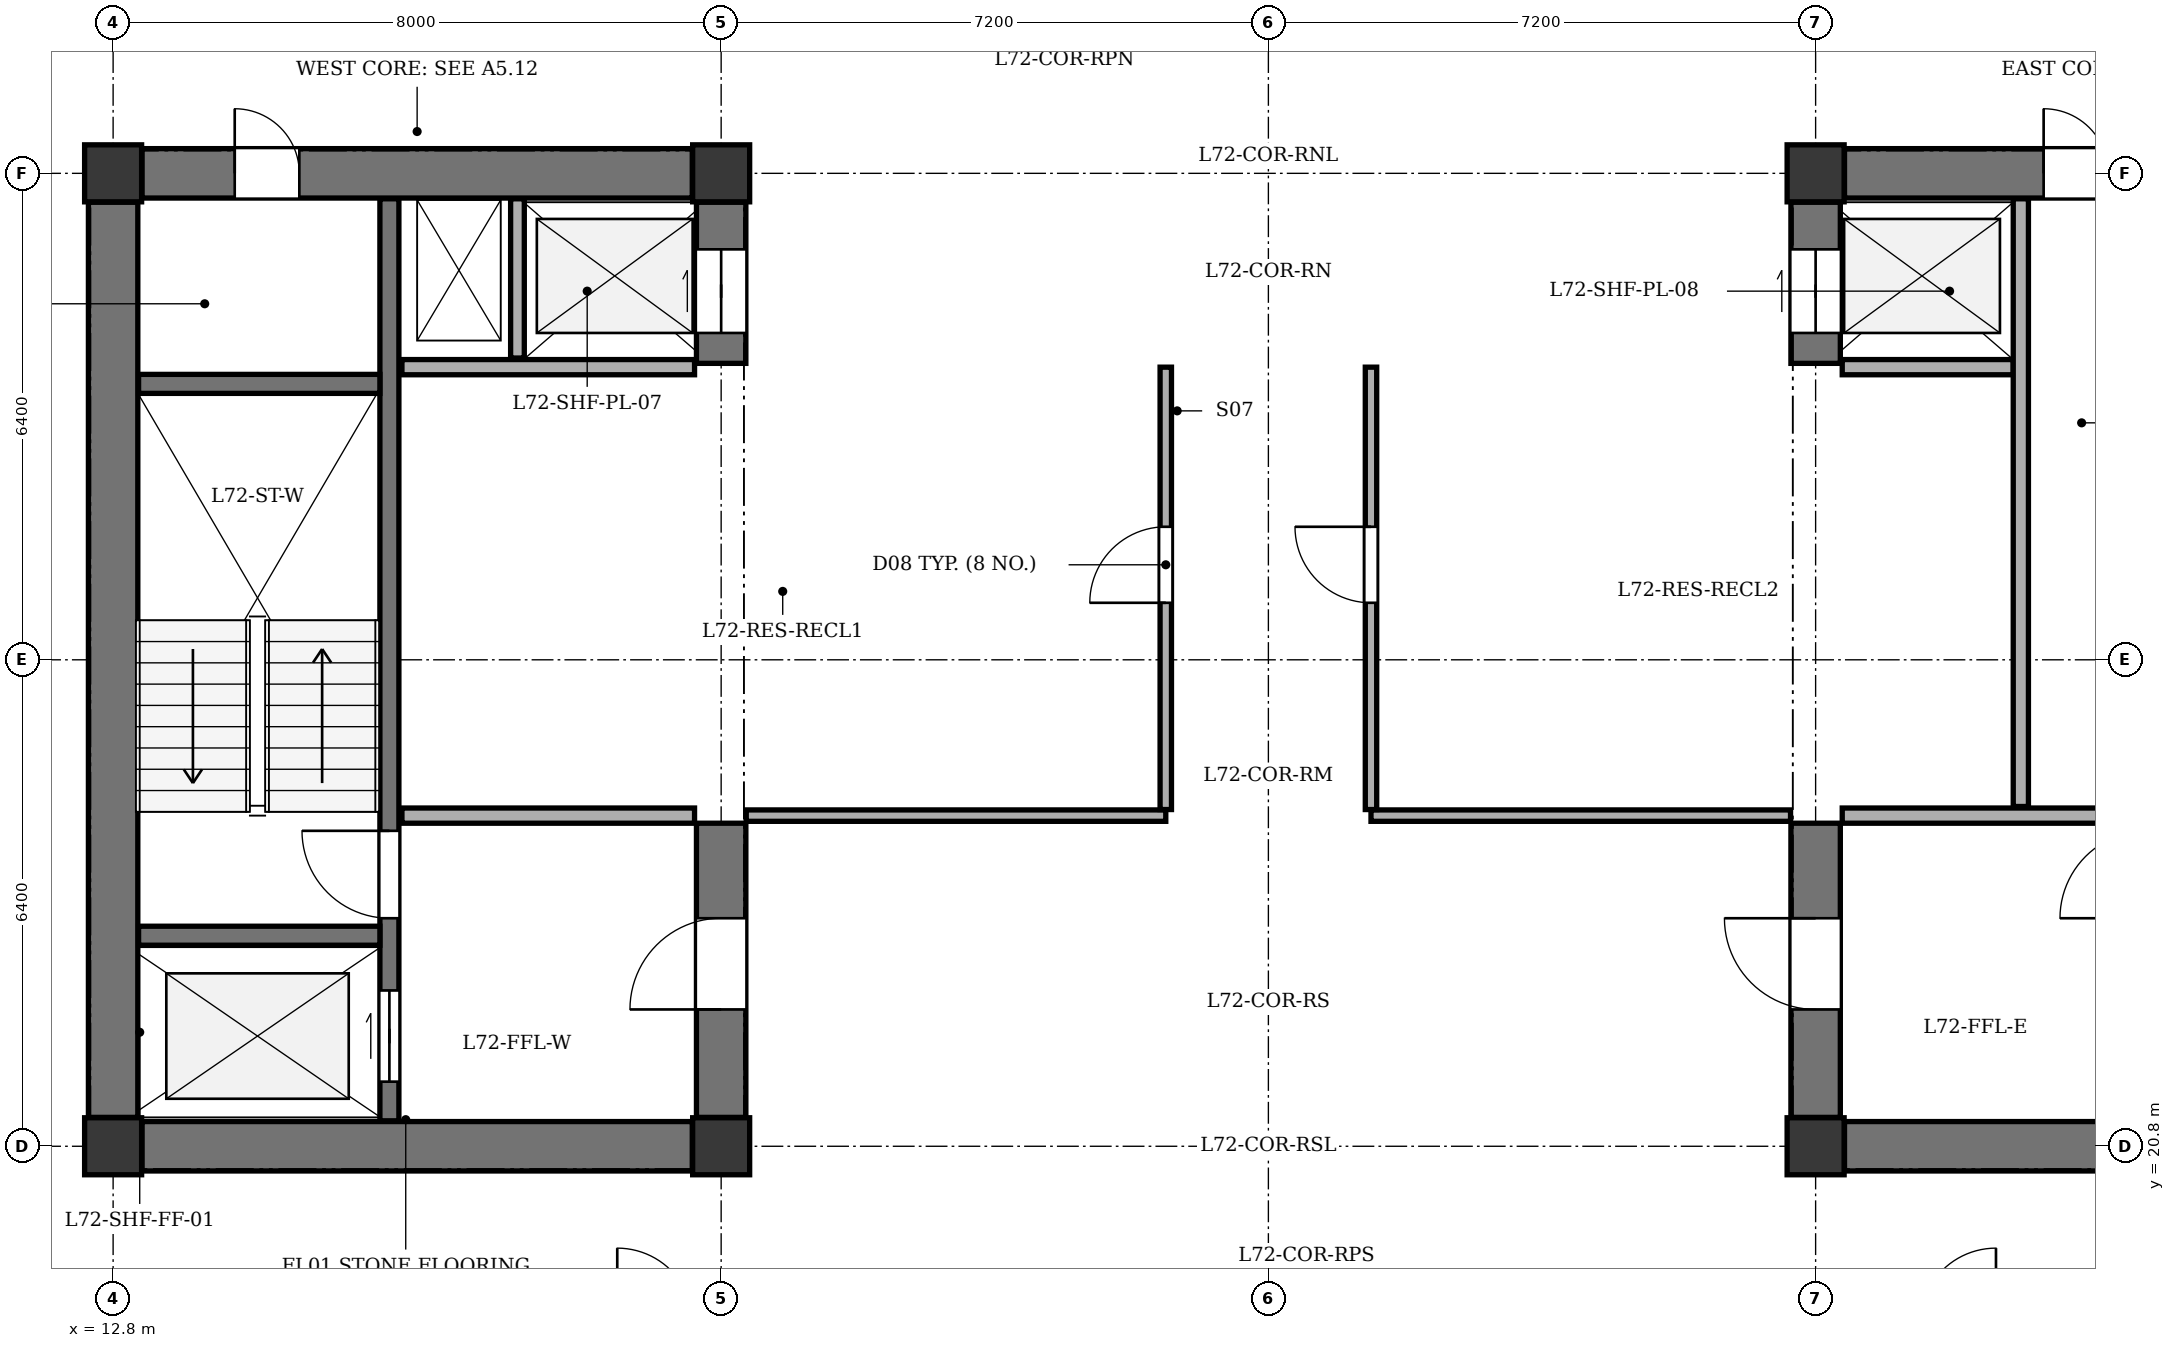
"""IFC4 building model, lengths in metres.
Left out: names, types, materials, properties, quantities, classifications, styles, units other than length and angle.
Written with IfcOpenShell. Run it as: python <this file> out.ifc"""

import sys

from ifc_helpers import new_model, si_unit, direction, frame, frame_2d, origin, origin_2d, place, context, subcontext, project, spatial, rectangle, extrude, element, fill, save


model = new_model("IFC4")
c1 = context("Model", 3, precision=1e-05, world=origin(), true_north=direction((0.0, 1.0)))
c2 = subcontext(c1, "Body", "Model", "MODEL_VIEW")
j1 = project(units=[si_unit("LENGTHUNIT", "METRE"), si_unit("PLANEANGLEUNIT", "RADIAN")], contexts=[c1])
p1 = place(None, origin())
s1 = spatial("IfcSite", under=j1, at=p1, CompositionType="ELEMENT")
p2 = place(p1, origin())
s2 = spatial("IfcBuilding", under=s1, at=p2, CompositionType="ELEMENT")
p3 = place(p2, frame((0.0, 0.0, 272.1)))
s3 = spatial("IfcBuildingStorey", under=s2, at=p3, CompositionType="ELEMENT", Elevation=272.1)
for number, where, z_axis, x_axis in (
    (1, (12.8, 20.8, 0.0), (0.0, 0.0, 1.0), (1.0, 0.0, 0.0)),
    (2, (20.8, 20.8, 0.0), (0.0, 0.0, 1.0), (1.0, 0.0, 0.0)),
    (3, (12.8, 33.6, 0.0), (0.0, 0.0, 1.0), (1.0, 0.0, 0.0)),
    (4, (20.8, 33.6, 0.0), (0.0, 0.0, 1.0), (1.0, 0.0, 0.0)),
    (5, (35.2, 20.8, 0.0), (0.0, 0.0, 1.0), (1.0, 0.0, 0.0)),
    (6, (35.2, 33.6, 0.0), (0.0, 0.0, 1.0), (1.0, 0.0, 0.0)),
):
    element("IfcColumn", number, at=place(p3, frame(where, z_axis=z_axis, x_axis=x_axis)), inside=s3, PredefinedType="COLUMN", context=c2, shape_type="SweptSolid", body=[
        extrude(rectangle(XDim=0.75, YDim=0.75, at=origin_2d()), origin(), (0.0, 0.0, 1.0), 3.4),
    ])
p4 = place(p3, frame((12.8, 21.18, 0.0), z_axis=(0.0, 0.0, 1.0), x_axis=(0.0, 1.0, 0.0)))
e7 = element("IfcWall", 7, at=p4, inside=s3, PredefinedType="SHEAR", context=c2, shape_type="SweptSolid", body=[
    extrude(rectangle(XDim=12.04, YDim=0.65, at=frame_2d((6.02, 0.0))), origin(), (0.0, 0.0, 1.0), 3.1),
])
p5 = place(p3, frame((13.18, 20.8, 0.0), z_axis=(0.0, 0.0, 1.0), x_axis=(1.0, 0.0, 0.0)))
e8 = element("IfcWall", 8, at=p5, inside=s3, PredefinedType="SHEAR", context=c2, shape_type="SweptSolid", body=[
    extrude(rectangle(XDim=7.24, YDim=0.65, at=frame_2d((3.62, 0.0))), origin(), (0.0, 0.0, 1.0), 3.1),
])
p6 = place(p3, frame((13.18, 33.6, 0.0), z_axis=(0.0, 0.0, 1.0), x_axis=(1.0, 0.0, 0.0)))
e9 = element("IfcWall", 9, at=p6, inside=s3, PredefinedType="SHEAR", context=c2, shape_type="SweptSolid", body=[
    extrude(rectangle(XDim=7.24, YDim=0.65, at=frame_2d((3.62, 0.0))), origin(), (0.0, 0.0, 1.0), 3.1),
])
p7 = place(p6, frame((1.22, 0.0, 0.0)))
e10 = element("IfcOpeningElement", 10, at=p7, cuts=e9, PredefinedType="OPENING", context=c2, shape_type="SweptSolid", body=[
    extrude(rectangle(XDim=0.85, YDim=2.02, at=frame_2d((0.425, 1.01))), frame((0.0, 0.335, 0.0), z_axis=(0.0, -1.0, 0.0), x_axis=(1.0, 0.0, 0.0)), (0.0, 0.0, 1.0), 0.67),
])
p8 = place(p3, frame((20.8, 21.18, 0.0), z_axis=(0.0, 0.0, 1.0), x_axis=(0.0, 1.0, 0.0)))
e11 = element("IfcWall", 11, at=p8, inside=s3, PredefinedType="SHEAR", context=c2, shape_type="SweptSolid", body=[
    extrude(rectangle(XDim=3.87, YDim=0.65, at=frame_2d((1.935, 0.0))), origin(), (0.0, 0.0, 1.0), 3.1),
])
p9 = place(p8, frame((1.42, 0.0, 0.0)))
e12 = element("IfcOpeningElement", 12, at=p9, cuts=e11, PredefinedType="OPENING", context=c2, shape_type="SweptSolid", body=[
    extrude(rectangle(XDim=1.2, YDim=2.15, at=frame_2d((0.6, 1.075))), frame((0.0, 0.335, 0.0), z_axis=(0.0, -1.0, 0.0), x_axis=(1.0, 0.0, 0.0)), (0.0, 0.0, 1.0), 0.67),
])
p10 = place(p3, frame((20.8, 31.1, 0.0), z_axis=(0.0, 0.0, 1.0), x_axis=(0.0, 1.0, 0.0)))
e13 = element("IfcWall", 13, at=p10, inside=s3, PredefinedType="SHEAR", context=c2, shape_type="SweptSolid", body=[
    extrude(rectangle(XDim=2.12, YDim=0.65, at=frame_2d((1.06, 0.0))), origin(), (0.0, 0.0, 1.0), 3.1),
])
p11 = place(p10, frame((0.4, 0.0, 0.0)))
e14 = element("IfcOpeningElement", 14, at=p11, cuts=e13, PredefinedType="OPENING", context=c2, shape_type="SweptSolid", body=[
    extrude(rectangle(XDim=1.1, YDim=2.1, at=frame_2d((0.55, 1.05))), frame((0.0, 0.335, 0.0), z_axis=(0.0, -1.0, 0.0), x_axis=(1.0, 0.0, 0.0)), (0.0, 0.0, 1.0), 0.67),
])
p12 = place(p3, frame((16.435, 21.135, 0.0), z_axis=(0.0, 0.0, 1.0), x_axis=(0.0, 1.0, 0.0)))
e15 = element("IfcWall", 15, at=p12, inside=s3, PredefinedType="SHEAR", context=c2, shape_type="SweptSolid", body=[
    extrude(rectangle(XDim=12.13, YDim=0.25, at=frame_2d((6.065, 0.0))), origin(), (0.0, 0.0, 1.0), 3.1),
])
p13 = place(p12, frame((0.515, 0.0, 0.0)))
e16 = element("IfcOpeningElement", 16, at=p13, cuts=e15, PredefinedType="OPENING", context=c2, shape_type="SweptSolid", body=[
    extrude(rectangle(XDim=1.2, YDim=2.15, at=frame_2d((0.6, 1.075))), frame((0.0, 0.135, 0.0), z_axis=(0.0, -1.0, 0.0), x_axis=(1.0, 0.0, 0.0)), (0.0, 0.0, 1.0), 0.27),
])
p14 = place(p12, frame((2.665, 0.0, 0.0)))
e17 = element("IfcOpeningElement", 17, at=p14, cuts=e15, PredefinedType="OPENING", context=c2, shape_type="SweptSolid", body=[
    extrude(rectangle(XDim=1.15, YDim=2.15, at=frame_2d((0.575, 1.075))), frame((0.0, 0.135, 0.0), z_axis=(0.0, -1.0, 0.0), x_axis=(1.0, 0.0, 0.0)), (0.0, 0.0, 1.0), 0.27),
])
for number, where, z_axis, x_axis in (
    (18, (13.135, 23.57, 0.0), (0.0, 0.0, 1.0), (1.0, 0.0, 0.0)),
    (19, (13.135, 30.83, 0.0), (0.0, 0.0, 1.0), (1.0, 0.0, 0.0)),
):
    element("IfcWall", number, at=place(p3, frame(where, z_axis=z_axis, x_axis=x_axis)), inside=s3, PredefinedType="SHEAR", context=c2, shape_type="SweptSolid", body=[
        extrude(rectangle(XDim=3.175, YDim=0.25, at=frame_2d((1.587, 0.0))), origin(), (0.0, 0.0, 1.0), 3.1),
    ])
for number, where, z_axis, x_axis in (
    (20, (16.6, 25.15, 0.0), (0.0, 0.0, 1.0), (1.0, 0.0, 0.0)),
    (21, (16.6, 31.05, 0.0), (0.0, 0.0, 1.0), (1.0, 0.0, 0.0)),
):
    element("IfcWall", number, at=place(p3, frame(where, z_axis=z_axis, x_axis=x_axis)), inside=s3, PredefinedType="SOLIDWALL", context=c2, shape_type="SweptSolid", body=[
        extrude(rectangle(XDim=3.85, YDim=0.2, at=frame_2d((1.925, 0.0))), origin(), (0.0, 0.0, 1.0), 3.1),
    ])
p15 = place(p3, frame((18.12, 31.17, 0.0), z_axis=(0.0, 0.0, 1.0), x_axis=(0.0, 1.0, 0.0)))
e22 = element("IfcWall", 22, at=p15, inside=s3, PredefinedType="PARTITIONING", context=c2, shape_type="SweptSolid", body=[
    extrude(rectangle(XDim=2.095, YDim=0.18, at=frame_2d((1.047, 0.0))), origin(), (0.0, 0.0, 1.0), 3.1),
])
p16 = place(p3, frame((35.58, 20.8, 0.0), z_axis=(0.0, 0.0, 1.0), x_axis=(1.0, 0.0, 0.0)))
e23 = element("IfcWall", 23, at=p16, inside=s3, PredefinedType="SHEAR", context=c2, shape_type="SweptSolid", body=[
    extrude(rectangle(XDim=7.24, YDim=0.65, at=frame_2d((3.62, 0.0))), origin(), (0.0, 0.0, 1.0), 3.1),
])
p17 = place(p3, frame((35.58, 33.6, 0.0), z_axis=(0.0, 0.0, 1.0), x_axis=(1.0, 0.0, 0.0)))
e24 = element("IfcWall", 24, at=p17, inside=s3, PredefinedType="SHEAR", context=c2, shape_type="SweptSolid", body=[
    extrude(rectangle(XDim=7.24, YDim=0.65, at=frame_2d((3.62, 0.0))), origin(), (0.0, 0.0, 1.0), 3.1),
])
p18 = place(p17, frame((4.82, 0.0, 0.0)))
e25 = element("IfcOpeningElement", 25, at=p18, cuts=e24, PredefinedType="OPENING", context=c2, shape_type="SweptSolid", body=[
    extrude(rectangle(XDim=1.3, YDim=2.15, at=frame_2d((0.65, 1.075))), frame((0.0, 0.335, 0.0), z_axis=(0.0, -1.0, 0.0), x_axis=(1.0, 0.0, 0.0)), (0.0, 0.0, 1.0), 0.67),
])
p19 = place(p17, frame((2.62, 0.0, 0.0)))
e26 = element("IfcOpeningElement", 26, at=p19, cuts=e24, PredefinedType="OPENING", context=c2, shape_type="SweptSolid", body=[
    extrude(rectangle(XDim=0.85, YDim=2.02, at=frame_2d((0.425, 1.01))), frame((0.0, 0.335, 0.0), z_axis=(0.0, -1.0, 0.0), x_axis=(1.0, 0.0, 0.0)), (0.0, 0.0, 1.0), 0.67),
])
p20 = place(p3, frame((35.2, 21.18, 0.0), z_axis=(0.0, 0.0, 1.0), x_axis=(0.0, 1.0, 0.0)))
e27 = element("IfcWall", 27, at=p20, inside=s3, PredefinedType="SHEAR", context=c2, shape_type="SweptSolid", body=[
    extrude(rectangle(XDim=3.87, YDim=0.65, at=frame_2d((1.935, 0.0))), origin(), (0.0, 0.0, 1.0), 3.1),
])
p21 = place(p20, frame((1.42, 0.0, 0.0)))
e28 = element("IfcOpeningElement", 28, at=p21, cuts=e27, PredefinedType="OPENING", context=c2, shape_type="SweptSolid", body=[
    extrude(rectangle(XDim=1.2, YDim=2.15, at=frame_2d((0.6, 1.075))), frame((0.0, 0.335, 0.0), z_axis=(0.0, -1.0, 0.0), x_axis=(1.0, 0.0, 0.0)), (0.0, 0.0, 1.0), 0.67),
])
p22 = place(p3, frame((35.2, 31.1, 0.0), z_axis=(0.0, 0.0, 1.0), x_axis=(0.0, 1.0, 0.0)))
e29 = element("IfcWall", 29, at=p22, inside=s3, PredefinedType="SHEAR", context=c2, shape_type="SweptSolid", body=[
    extrude(rectangle(XDim=2.12, YDim=0.65, at=frame_2d((1.06, 0.0))), origin(), (0.0, 0.0, 1.0), 3.1),
])
p23 = place(p22, frame((0.4, 0.0, 0.0)))
e30 = element("IfcOpeningElement", 30, at=p23, cuts=e29, PredefinedType="OPENING", context=c2, shape_type="SweptSolid", body=[
    extrude(rectangle(XDim=1.1, YDim=2.1, at=frame_2d((0.55, 1.05))), frame((0.0, 0.335, 0.0), z_axis=(0.0, -1.0, 0.0), x_axis=(1.0, 0.0, 0.0)), (0.0, 0.0, 1.0), 0.67),
])
p24 = place(p3, frame((35.55, 25.15, 0.0), z_axis=(0.0, 0.0, 1.0), x_axis=(1.0, 0.0, 0.0)))
e31 = element("IfcWall", 31, at=p24, inside=s3, PredefinedType="SOLIDWALL", context=c2, shape_type="SweptSolid", body=[
    extrude(rectangle(XDim=3.85, YDim=0.2, at=frame_2d((1.925, 0.0))), origin(), (0.0, 0.0, 1.0), 3.1),
])
p25 = place(p3, frame((35.55, 31.05, 0.0), z_axis=(0.0, 0.0, 1.0), x_axis=(1.0, 0.0, 0.0)))
e32 = element("IfcWall", 32, at=p25, inside=s3, PredefinedType="SOLIDWALL", context=c2, shape_type="SweptSolid", body=[
    extrude(rectangle(XDim=2.25, YDim=0.2, at=frame_2d((1.125, 0.0))), origin(), (0.0, 0.0, 1.0), 3.1),
])
p26 = place(p3, frame((37.9, 25.27, 0.0), z_axis=(0.0, 0.0, 1.0), x_axis=(0.0, 1.0, 0.0)))
e33 = element("IfcWall", 33, at=p26, inside=s3, PredefinedType="SOLIDWALL", context=c2, shape_type="SweptSolid", body=[
    extrude(rectangle(XDim=7.995, YDim=0.2, at=frame_2d((3.998, 0.0))), origin(), (0.0, 0.0, 1.0), 3.1),
])
for number, where, z_axis, x_axis in (
    (34, (21.13, 25.15, 0.0), (0.0, 0.0, 1.0), (1.0, 0.0, 0.0)),
    (35, (29.35, 25.15, 0.0), (0.0, 0.0, 1.0), (1.0, 0.0, 0.0)),
):
    element("IfcWall", number, at=place(p3, frame(where, z_axis=z_axis, x_axis=x_axis)), inside=s3, PredefinedType="PARTITIONING", context=c2, shape_type="SweptSolid", body=[
        extrude(rectangle(XDim=5.52, YDim=0.15, at=frame_2d((2.76, 0.0))), origin(), (0.0, 0.0, 1.0), 3.1),
    ])
p27 = place(p3, frame((26.65, 25.23, 0.0), z_axis=(0.0, 0.0, 1.0), x_axis=(0.0, 1.0, 0.0)))
e36 = element("IfcWall", 36, at=p27, inside=s3, PredefinedType="PARTITIONING", context=c2, shape_type="SweptSolid", body=[
    extrude(rectangle(XDim=5.82, YDim=0.15, at=frame_2d((2.91, 0.0))), origin(), (0.0, 0.0, 1.0), 3.1),
])
p28 = place(p27, frame((2.72, 0.0, 0.0)))
e37 = element("IfcOpeningElement", 37, at=p28, cuts=e36, PredefinedType="OPENING", context=c2, shape_type="SweptSolid", body=[
    extrude(rectangle(XDim=1.0, YDim=2.1, at=frame_2d((0.5, 1.05))), frame((0.0, 0.085, 0.0), z_axis=(0.0, -1.0, 0.0), x_axis=(1.0, 0.0, 0.0)), (0.0, 0.0, 1.0), 0.17),
])
p29 = place(p3, frame((29.35, 25.23, 0.0), z_axis=(0.0, 0.0, 1.0), x_axis=(0.0, 1.0, 0.0)))
e38 = element("IfcWall", 38, at=p29, inside=s3, PredefinedType="PARTITIONING", context=c2, shape_type="SweptSolid", body=[
    extrude(rectangle(XDim=5.82, YDim=0.15, at=frame_2d((2.91, 0.0))), origin(), (0.0, 0.0, 1.0), 3.1),
])
p30 = place(p29, frame((2.72, 0.0, 0.0)))
e39 = element("IfcOpeningElement", 39, at=p30, cuts=e38, PredefinedType="OPENING", context=c2, shape_type="SweptSolid", body=[
    extrude(rectangle(XDim=1.0, YDim=2.1, at=frame_2d((0.5, 1.05))), frame((0.0, 0.085, 0.0), z_axis=(0.0, -1.0, 0.0), x_axis=(1.0, 0.0, 0.0)), (0.0, 0.0, 1.0), 0.17),
])
p31 = place(p7, origin())
e40 = element("IfcDoor", 40, at=p31, inside=s3, OperationType="SINGLE_SWING_LEFT", PredefinedType="DOOR", context=c2, shape_type="SweptSolid", body=[
    extrude(rectangle(XDim=0.85, YDim=2.02, at=frame_2d((0.425, 1.01))), frame((0.0, 0.025, 0.0), z_axis=(0.0, -1.0, 0.0), x_axis=(1.0, 0.0, 0.0)), (0.0, 0.0, 1.0), 0.05),
])
fill(e10, e40)
p32 = place(p9, origin())
e41 = element("IfcDoor", 41, at=p32, inside=s3, OperationType="SINGLE_SWING_LEFT", PredefinedType="DOOR", context=c2, shape_type="SweptSolid", body=[
    extrude(rectangle(XDim=1.2, YDim=2.15, at=frame_2d((0.6, 1.075))), frame((0.0, 0.025, 0.0), z_axis=(0.0, -1.0, 0.0), x_axis=(1.0, 0.0, 0.0)), (0.0, 0.0, 1.0), 0.05),
])
fill(e12, e41)
p33 = place(p11, origin())
e42 = element("IfcDoor", 42, at=p33, inside=s3, OperationType="DOUBLE_DOOR_SLIDING", PredefinedType="DOOR", context=c2, shape_type="SweptSolid", body=[
    extrude(rectangle(XDim=1.1, YDim=2.1, at=frame_2d((0.55, 1.05))), frame((0.0, 0.025, 0.0), z_axis=(0.0, -1.0, 0.0), x_axis=(1.0, 0.0, 0.0)), (0.0, 0.0, 1.0), 0.05),
])
fill(e14, e42)
p34 = place(p13, origin())
e43 = element("IfcDoor", 43, at=p34, inside=s3, OperationType="DOUBLE_DOOR_SLIDING", PredefinedType="DOOR", context=c2, shape_type="SweptSolid", body=[
    extrude(rectangle(XDim=1.2, YDim=2.15, at=frame_2d((0.6, 1.075))), frame((0.0, 0.025, 0.0), z_axis=(0.0, -1.0, 0.0), x_axis=(1.0, 0.0, 0.0)), (0.0, 0.0, 1.0), 0.05),
])
fill(e16, e43)
p35 = place(p14, origin())
e44 = element("IfcDoor", 44, at=p35, inside=s3, OperationType="SINGLE_SWING_RIGHT", PredefinedType="DOOR", context=c2, shape_type="SweptSolid", body=[
    extrude(rectangle(XDim=1.15, YDim=2.15, at=frame_2d((0.575, 1.075))), frame((0.0, 0.025, 0.0), z_axis=(0.0, -1.0, 0.0), x_axis=(1.0, 0.0, 0.0)), (0.0, 0.0, 1.0), 0.05),
])
fill(e17, e44)
p36 = place(p19, origin())
e45 = element("IfcDoor", 45, at=p36, inside=s3, OperationType="SINGLE_SWING_LEFT", PredefinedType="DOOR", context=c2, shape_type="SweptSolid", body=[
    extrude(rectangle(XDim=0.85, YDim=2.02, at=frame_2d((0.425, 1.01))), frame((0.0, 0.025, 0.0), z_axis=(0.0, -1.0, 0.0), x_axis=(1.0, 0.0, 0.0)), (0.0, 0.0, 1.0), 0.05),
])
fill(e26, e45)
p37 = place(p21, origin())
e46 = element("IfcDoor", 46, at=p37, inside=s3, OperationType="SINGLE_SWING_RIGHT", PredefinedType="DOOR", context=c2, shape_type="SweptSolid", body=[
    extrude(rectangle(XDim=1.2, YDim=2.15, at=frame_2d((0.6, 1.075))), frame((0.0, 0.025, 0.0), z_axis=(0.0, -1.0, 0.0), x_axis=(1.0, 0.0, 0.0)), (0.0, 0.0, 1.0), 0.05),
])
fill(e28, e46)
p38 = place(p23, origin())
e47 = element("IfcDoor", 47, at=p38, inside=s3, OperationType="DOUBLE_DOOR_SLIDING", PredefinedType="DOOR", context=c2, shape_type="SweptSolid", body=[
    extrude(rectangle(XDim=1.1, YDim=2.1, at=frame_2d((0.55, 1.05))), frame((0.0, 0.025, 0.0), z_axis=(0.0, -1.0, 0.0), x_axis=(1.0, 0.0, 0.0)), (0.0, 0.0, 1.0), 0.05),
])
fill(e30, e47)
p39 = place(p28, origin())
e48 = element("IfcDoor", 48, at=p39, inside=s3, OperationType="SINGLE_SWING_LEFT", PredefinedType="DOOR", context=c2, shape_type="SweptSolid", body=[
    extrude(rectangle(XDim=1.0, YDim=2.1, at=frame_2d((0.5, 1.05))), frame((0.0, 0.025, 0.0), z_axis=(0.0, -1.0, 0.0), x_axis=(1.0, 0.0, 0.0)), (0.0, 0.0, 1.0), 0.05),
])
fill(e37, e48)
p40 = place(p30, origin())
e49 = element("IfcDoor", 49, at=p40, inside=s3, OperationType="SINGLE_SWING_RIGHT", PredefinedType="DOOR", context=c2, shape_type="SweptSolid", body=[
    extrude(rectangle(XDim=1.0, YDim=2.1, at=frame_2d((0.5, 1.05))), frame((0.0, 0.025, 0.0), z_axis=(0.0, -1.0, 0.0), x_axis=(1.0, 0.0, 0.0)), (0.0, 0.0, 1.0), 0.05),
])
fill(e39, e49)
save(model, sys.argv[1])
